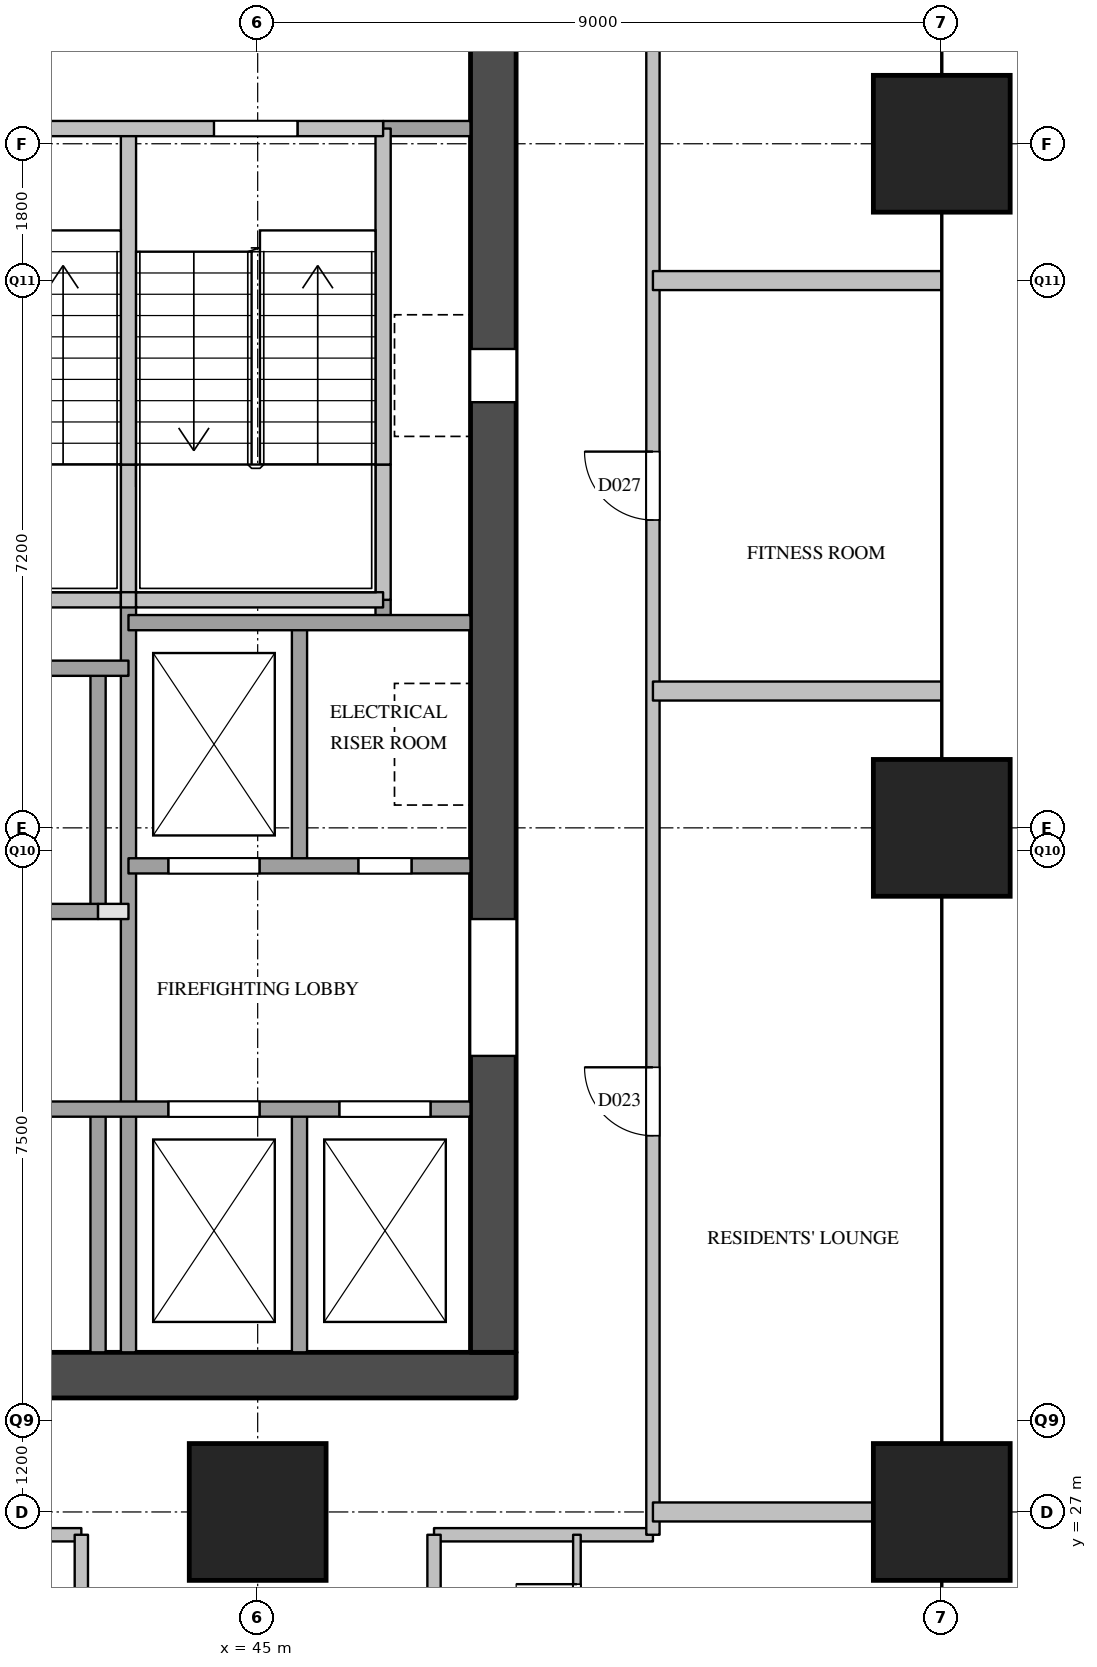
"""IFC4 building model, lengths in metres.
Left out: names, types, materials, properties, quantities, classifications, styles, units other than length and angle.
Written with IfcOpenShell. Run it as: python <this file> out.ifc"""

import sys

from ifc_helpers import new_model, si_unit, direction, frame, frame_2d, origin, origin_2d, place, context, subcontext, project, spatial, rectangle, extrude, element, fill, save


model = new_model("IFC4")
c1 = context("Model", 3, precision=1e-05, world=origin(), true_north=direction((0.0, 1.0)))
c2 = subcontext(c1, "Body", "Model", "MODEL_VIEW")
j1 = project(units=[si_unit("LENGTHUNIT", "METRE"), si_unit("PLANEANGLEUNIT", "RADIAN")], contexts=[c1])
p1 = place(None, origin())
s1 = spatial("IfcSite", under=j1, at=p1, CompositionType="ELEMENT")
p2 = place(p1, origin())
s2 = spatial("IfcBuilding", under=s1, at=p2, CompositionType="ELEMENT")
p3 = place(p2, frame((0.0, 0.0, 31.0)))
s3 = spatial("IfcBuildingStorey", under=s2, at=p3, CompositionType="ELEMENT", Elevation=31.0)
for number, where, z_axis, x_axis in (
    (1, (45.0, 27.0, 0.0), (0.0, 0.0, 1.0), (1.0, 0.0, 0.0)),
    (2, (54.0, 27.0, 0.0), (0.0, 0.0, 1.0), (1.0, 0.0, 0.0)),
    (3, (54.0, 36.0, 0.0), (0.0, 0.0, 1.0), (1.0, 0.0, 0.0)),
    (4, (54.0, 45.0, 0.0), (0.0, 0.0, 1.0), (1.0, 0.0, 0.0)),
):
    element("IfcColumn", number, at=place(p3, frame(where, z_axis=z_axis, x_axis=x_axis)), inside=s3, PredefinedType="COLUMN", context=c2, shape_type="SweptSolid", body=[
        extrude(rectangle(XDim=1.8, YDim=1.8, at=origin_2d()), origin(), (0.0, 0.0, 1.0), 3.8),
    ])
p4 = place(p3, frame((36.0, 28.8, 0.0), z_axis=(0.0, 0.0, 1.0), x_axis=(1.0, 0.0, 0.0)))
e5 = element("IfcWall", 5, at=p4, inside=s3, PredefinedType="SHEAR", context=c2, shape_type="SweptSolid", body=[
    extrude(rectangle(XDim=12.4, YDim=0.6, at=frame_2d((6.2, 0.0))), origin(), (0.0, 0.0, 1.0), 3.5),
])
p5 = place(p3, frame((48.1, 29.1, 0.0), z_axis=(0.0, 0.0, 1.0), x_axis=(0.0, 1.0, 0.0)))
e6 = element("IfcWall", 6, at=p5, inside=s3, PredefinedType="SHEAR", context=c2, shape_type="SweptSolid", body=[
    extrude(rectangle(XDim=20.3, YDim=0.6, at=frame_2d((10.15, 0.0))), origin(), (0.0, 0.0, 1.0), 3.5),
])
p6 = place(p5, frame((12.5, 0.0, 0.0)))
e7 = element("IfcOpeningElement", 7, at=p6, cuts=e6, PredefinedType="OPENING", context=c2, shape_type="SweptSolid", body=[
    extrude(rectangle(XDim=0.7, YDim=2.1, at=frame_2d((0.35, 1.05))), frame((0.0, 0.31, 0.0), z_axis=(0.0, -1.0, 0.0), x_axis=(1.0, 0.0, 0.0)), (0.0, 0.0, 1.0), 0.62),
])
p7 = place(p5, frame((3.9, 0.0, 0.0)))
e8 = element("IfcOpeningElement", 8, at=p7, cuts=e6, PredefinedType="OPENING", context=c2, shape_type="SweptSolid", body=[
    extrude(rectangle(XDim=1.8, YDim=2.1, at=frame_2d((0.9, 1.05))), frame((0.0, 0.31, 0.0), z_axis=(0.0, -1.0, 0.0), x_axis=(1.0, 0.0, 0.0)), (0.0, 0.0, 1.0), 0.62),
])
p8 = place(p3, frame((42.9, 29.1, 0.0), z_axis=(0.0, 0.0, 1.0), x_axis=(0.0, 1.0, 0.0)))
e9 = element("IfcWall", 9, at=p8, inside=s3, PredefinedType="SOLIDWALL", context=c2, shape_type="SweptSolid", body=[
    extrude(rectangle(XDim=3.2, YDim=0.2, at=frame_2d((1.6, 0.0))), origin(), (0.0, 0.0, 1.0), 3.5),
])
p9 = place(p3, frame((42.9, 34.9, 0.0), z_axis=(0.0, 0.0, 1.0), x_axis=(0.0, 1.0, 0.0)))
e10 = element("IfcWall", 10, at=p9, inside=s3, PredefinedType="SOLIDWALL", context=c2, shape_type="SweptSolid", body=[
    extrude(rectangle(XDim=3.2, YDim=0.2, at=frame_2d((1.6, 0.0))), origin(), (0.0, 0.0, 1.0), 3.5),
])
p10 = place(p3, frame((43.3, 29.1, 0.0), z_axis=(0.0, 0.0, 1.0), x_axis=(0.0, 1.0, 0.0)))
e11 = element("IfcWall", 11, at=p10, inside=s3, PredefinedType="SOLIDWALL", context=c2, shape_type="SweptSolid", body=[
    extrude(rectangle(XDim=9.9, YDim=0.2, at=frame_2d((4.95, 0.0))), origin(), (0.0, 0.0, 1.0), 3.5),
])
p11 = place(p3, frame((43.3, 39.0, 0.0), z_axis=(0.0, 0.0, 1.0), x_axis=(0.0, 1.0, 0.0)))
e12 = element("IfcWall", 12, at=p11, inside=s3, PredefinedType="SOLIDWALL", context=c2, shape_type="SweptSolid", body=[
    extrude(rectangle(XDim=1.78, YDim=0.2, at=frame_2d((0.89, 0.0))), origin(), (0.0, 0.0, 1.0), 3.5),
])
p12 = place(p3, frame((43.3, 40.78, 0.0), z_axis=(0.0, 0.0, 1.0), x_axis=(0.0, 1.0, 0.0)))
e13 = element("IfcWall", 13, at=p12, inside=s3, PredefinedType="SOLIDWALL", context=c2, shape_type="SweptSolid", body=[
    extrude(rectangle(XDim=4.42, YDim=0.2, at=frame_2d((2.21, 0.0))), origin(), (0.0, 0.0, 1.0), 3.5),
])
for number, where, z_axis, x_axis in (
    (14, (45.55, 29.1, 0.0), (0.0, 0.0, 1.0), (0.0, 1.0, 0.0)),
    (15, (45.55, 35.5, 0.0), (0.0, 0.0, 1.0), (0.0, 1.0, 0.0)),
):
    element("IfcWall", number, at=place(p3, frame(where, z_axis=z_axis, x_axis=x_axis)), inside=s3, PredefinedType="SOLIDWALL", context=c2, shape_type="SweptSolid", body=[
        extrude(rectangle(XDim=3.2, YDim=0.2, at=frame_2d((1.6, 0.0))), origin(), (0.0, 0.0, 1.0), 3.5),
    ])
p13 = place(p3, frame((46.65, 38.7, 0.0), z_axis=(0.0, 0.0, 1.0), x_axis=(0.0, 1.0, 0.0)))
e16 = element("IfcWall", 16, at=p13, inside=s3, PredefinedType="SOLIDWALL", context=c2, shape_type="SweptSolid", body=[
    extrude(rectangle(XDim=0.3, YDim=0.2, at=frame_2d((0.15, 0.0))), origin(), (0.0, 0.0, 1.0), 3.5),
])
p14 = place(p3, frame((46.65, 39.0, 0.0), z_axis=(0.0, 0.0, 1.0), x_axis=(0.0, 1.0, 0.0)))
e17 = element("IfcWall", 17, at=p14, inside=s3, PredefinedType="SOLIDWALL", context=c2, shape_type="SweptSolid", body=[
    extrude(rectangle(XDim=1.78, YDim=0.2, at=frame_2d((0.89, 0.0))), origin(), (0.0, 0.0, 1.0), 3.5),
])
p15 = place(p3, frame((46.65, 40.78, 0.0), z_axis=(0.0, 0.0, 1.0), x_axis=(0.0, 1.0, 0.0)))
e18 = element("IfcWall", 18, at=p15, inside=s3, PredefinedType="SOLIDWALL", context=c2, shape_type="SweptSolid", body=[
    extrude(rectangle(XDim=4.42, YDim=0.2, at=frame_2d((2.21, 0.0))), origin(), (0.0, 0.0, 1.0), 3.5),
])
p16 = place(p3, frame((36.6, 32.3, 0.0), z_axis=(0.0, 0.0, 1.0), x_axis=(1.0, 0.0, 0.0)))
e19 = element("IfcWall", 19, at=p16, inside=s3, PredefinedType="SOLIDWALL", context=c2, shape_type="SweptSolid", body=[
    extrude(rectangle(XDim=11.2, YDim=0.2, at=frame_2d((5.6, 0.0))), origin(), (0.0, 0.0, 1.0), 3.5),
])
p17 = place(p16, frame((7.225, 0.0, 0.0)))
e20 = element("IfcOpeningElement", 20, at=p17, cuts=e19, PredefinedType="OPENING", context=c2, shape_type="SweptSolid", body=[
    extrude(rectangle(XDim=1.2, YDim=2.1, at=frame_2d((0.6, 1.05))), frame((0.0, 0.11, 0.0), z_axis=(0.0, -1.0, 0.0), x_axis=(1.0, 0.0, 0.0)), (0.0, 0.0, 1.0), 0.22),
])
p18 = place(p16, frame((9.475, 0.0, 0.0)))
e21 = element("IfcOpeningElement", 21, at=p18, cuts=e19, PredefinedType="OPENING", context=c2, shape_type="SweptSolid", body=[
    extrude(rectangle(XDim=1.2, YDim=2.1, at=frame_2d((0.6, 1.05))), frame((0.0, 0.11, 0.0), z_axis=(0.0, -1.0, 0.0), x_axis=(1.0, 0.0, 0.0)), (0.0, 0.0, 1.0), 0.22),
])
p19 = place(p3, frame((42.9, 34.9, 0.0), z_axis=(0.0, 0.0, 1.0), x_axis=(1.0, 0.0, 0.0)))
e22 = element("IfcWall", 22, at=p19, inside=s3, PredefinedType="PARTITIONING", context=c2, shape_type="SweptSolid", body=[
    extrude(rectangle(XDim=0.4, YDim=0.2, at=frame_2d((0.2, 0.0))), origin(), (0.0, 0.0, 1.0), 3.5),
])
p20 = place(p3, frame((36.6, 34.9, 0.0), z_axis=(0.0, 0.0, 1.0), x_axis=(1.0, 0.0, 0.0)))
e23 = element("IfcWall", 23, at=p20, inside=s3, PredefinedType="SOLIDWALL", context=c2, shape_type="SweptSolid", body=[
    extrude(rectangle(XDim=6.3, YDim=0.2, at=frame_2d((3.15, 0.0))), origin(), (0.0, 0.0, 1.0), 3.5),
])
p21 = place(p3, frame((43.3, 35.5, 0.0), z_axis=(0.0, 0.0, 1.0), x_axis=(1.0, 0.0, 0.0)))
e24 = element("IfcWall", 24, at=p21, inside=s3, PredefinedType="SOLIDWALL", context=c2, shape_type="SweptSolid", body=[
    extrude(rectangle(XDim=4.5, YDim=0.2, at=frame_2d((2.25, 0.0))), origin(), (0.0, 0.0, 1.0), 3.5),
])
p22 = place(p21, frame((0.525, 0.0, 0.0)))
e25 = element("IfcOpeningElement", 25, at=p22, cuts=e24, PredefinedType="OPENING", context=c2, shape_type="SweptSolid", body=[
    extrude(rectangle(XDim=1.2, YDim=2.1, at=frame_2d((0.6, 1.05))), frame((0.0, 0.11, 0.0), z_axis=(0.0, -1.0, 0.0), x_axis=(1.0, 0.0, 0.0)), (0.0, 0.0, 1.0), 0.22),
])
p23 = place(p21, frame((3.025, 0.0, 0.0)))
e26 = element("IfcOpeningElement", 26, at=p23, cuts=e24, PredefinedType="OPENING", context=c2, shape_type="SweptSolid", body=[
    extrude(rectangle(XDim=0.7, YDim=2.1, at=frame_2d((0.35, 1.05))), frame((0.0, 0.11, 0.0), z_axis=(0.0, -1.0, 0.0), x_axis=(1.0, 0.0, 0.0)), (0.0, 0.0, 1.0), 0.22),
])
p24 = place(p3, frame((36.6, 38.1, 0.0), z_axis=(0.0, 0.0, 1.0), x_axis=(1.0, 0.0, 0.0)))
e27 = element("IfcWall", 27, at=p24, inside=s3, PredefinedType="SOLIDWALL", context=c2, shape_type="SweptSolid", body=[
    extrude(rectangle(XDim=6.7, YDim=0.2, at=frame_2d((3.35, 0.0))), origin(), (0.0, 0.0, 1.0), 3.5),
])
p25 = place(p3, frame((43.3, 38.7, 0.0), z_axis=(0.0, 0.0, 1.0), x_axis=(1.0, 0.0, 0.0)))
e28 = element("IfcWall", 28, at=p25, inside=s3, PredefinedType="SOLIDWALL", context=c2, shape_type="SweptSolid", body=[
    extrude(rectangle(XDim=4.5, YDim=0.2, at=frame_2d((2.25, 0.0))), origin(), (0.0, 0.0, 1.0), 3.5),
])
p26 = place(p3, frame((40.05, 39.0, 0.0), z_axis=(0.0, 0.0, 1.0), x_axis=(1.0, 0.0, 0.0)))
e29 = element("IfcWall", 29, at=p26, inside=s3, PredefinedType="SOLIDWALL", context=c2, shape_type="SweptSolid", body=[
    extrude(rectangle(XDim=3.15, YDim=0.2, at=frame_2d((1.575, 0.0))), origin(), (0.0, 0.0, 1.0), 3.5),
])
p27 = place(p3, frame((43.2, 39.0, 0.0), z_axis=(0.0, 0.0, 1.0), x_axis=(1.0, 0.0, 0.0)))
e30 = element("IfcWall", 30, at=p27, inside=s3, PredefinedType="SOLIDWALL", context=c2, shape_type="SweptSolid", body=[
    extrude(rectangle(XDim=0.2, YDim=0.2, at=frame_2d((0.1, 0.0))), origin(), (0.0, 0.0, 1.0), 3.5),
])
p28 = place(p3, frame((43.4, 39.0, 0.0), z_axis=(0.0, 0.0, 1.0), x_axis=(1.0, 0.0, 0.0)))
e31 = element("IfcWall", 31, at=p28, inside=s3, PredefinedType="SOLIDWALL", context=c2, shape_type="SweptSolid", body=[
    extrude(rectangle(XDim=3.25, YDim=0.2, at=frame_2d((1.625, 0.0))), origin(), (0.0, 0.0, 1.0), 3.5),
])
p29 = place(p3, frame((46.65, 45.2, 0.0), z_axis=(0.0, 0.0, 1.0), x_axis=(1.0, 0.0, 0.0)))
e32 = element("IfcWall", 32, at=p29, inside=s3, PredefinedType="SOLIDWALL", context=c2, shape_type="SweptSolid", body=[
    extrude(rectangle(XDim=1.15, YDim=0.2, at=frame_2d((0.575, 0.0))), origin(), (0.0, 0.0, 1.0), 3.5),
])
p30 = place(p3, frame((36.6, 45.2, 0.0), z_axis=(0.0, 0.0, 1.0), x_axis=(1.0, 0.0, 0.0)))
e33 = element("IfcWall", 33, at=p30, inside=s3, PredefinedType="SOLIDWALL", context=c2, shape_type="SweptSolid", body=[
    extrude(rectangle(XDim=10.05, YDim=0.2, at=frame_2d((5.025, 0.0))), origin(), (0.0, 0.0, 1.0), 3.5),
])
p31 = place(p30, frame((1.125, 0.0, 0.0)))
e34 = element("IfcOpeningElement", 34, at=p31, cuts=e33, PredefinedType="OPENING", context=c2, shape_type="SweptSolid", body=[
    extrude(rectangle(XDim=1.1, YDim=2.1, at=frame_2d((0.55, 1.05))), frame((0.0, 0.11, 0.0), z_axis=(0.0, -1.0, 0.0), x_axis=(1.0, 0.0, 0.0)), (0.0, 0.0, 1.0), 0.22),
])
p32 = place(p30, frame((4.475, 0.0, 0.0)))
e35 = element("IfcOpeningElement", 35, at=p32, cuts=e33, PredefinedType="OPENING", context=c2, shape_type="SweptSolid", body=[
    extrude(rectangle(XDim=1.1, YDim=2.1, at=frame_2d((0.55, 1.05))), frame((0.0, 0.11, 0.0), z_axis=(0.0, -1.0, 0.0), x_axis=(1.0, 0.0, 0.0)), (0.0, 0.0, 1.0), 0.22),
])
p33 = place(p30, frame((7.825, 0.0, 0.0)))
e36 = element("IfcOpeningElement", 36, at=p33, cuts=e33, PredefinedType="OPENING", context=c2, shape_type="SweptSolid", body=[
    extrude(rectangle(XDim=1.1, YDim=2.1, at=frame_2d((0.55, 1.05))), frame((0.0, 0.11, 0.0), z_axis=(0.0, -1.0, 0.0), x_axis=(1.0, 0.0, 0.0)), (0.0, 0.0, 1.0), 0.22),
])
p34 = place(p3, frame((38.32, 26.7, 0.0), z_axis=(0.0, 0.0, 1.0), x_axis=(1.0, 0.0, 0.0)))
e37 = element("IfcWall", 37, at=p34, inside=s3, PredefinedType="PARTITIONING", context=c2, shape_type="SweptSolid", body=[
    extrude(rectangle(XDim=4.36, YDim=0.175, at=frame_2d((2.18, 0.0))), origin(), (0.0, 0.0, 1.0), 2.5),
])
p35 = place(p3, frame((47.32, 26.7, 0.0), z_axis=(0.0, 0.0, 1.0), x_axis=(1.0, 0.0, 0.0)))
e38 = element("IfcWall", 38, at=p35, inside=s3, PredefinedType="PARTITIONING", context=c2, shape_type="SweptSolid", body=[
    extrude(rectangle(XDim=2.88, YDim=0.175, at=frame_2d((1.44, 0.0))), origin(), (0.0, 0.0, 1.0), 2.5),
])
p36 = place(p3, frame((42.68, 24.3, 0.0), z_axis=(0.0, 0.0, 1.0), x_axis=(0.0, 1.0, 0.0)))
e39 = element("IfcWall", 39, at=p36, inside=s3, PredefinedType="PARTITIONING", context=c2, shape_type="SweptSolid", body=[
    extrude(rectangle(XDim=2.4, YDim=0.175, at=frame_2d((1.2, 0.0))), origin(), (0.0, 0.0, 1.0), 2.5),
])
p37 = place(p3, frame((47.32, 24.89, 0.0), z_axis=(0.0, 0.0, 1.0), x_axis=(0.0, 1.0, 0.0)))
e40 = element("IfcWall", 40, at=p37, inside=s3, PredefinedType="PARTITIONING", context=c2, shape_type="SweptSolid", body=[
    extrude(rectangle(XDim=1.81, YDim=0.175, at=frame_2d((0.905, 0.0))), origin(), (0.0, 0.0, 1.0), 2.5),
])
p38 = place(p3, frame((50.2, 26.7, 0.0), z_axis=(0.0, 0.0, 1.0), x_axis=(0.0, 1.0, 0.0)))
e41 = element("IfcWall", 41, at=p38, inside=s3, PredefinedType="PARTITIONING", context=c2, shape_type="SweptSolid", body=[
    extrude(rectangle(XDim=25.1, YDim=0.175, at=frame_2d((12.55, 0.0))), origin(), (0.0, 0.0, 1.0), 2.5),
])
p39 = place(p38, frame((5.25, 0.0, 0.0)))
e42 = element("IfcOpeningElement", 42, at=p39, cuts=e41, PredefinedType="OPENING", context=c2, shape_type="SweptSolid", body=[
    extrude(rectangle(XDim=0.9, YDim=2.1, at=frame_2d((0.45, 1.05))), frame((0.0, 0.097, 0.0), z_axis=(0.0, -1.0, 0.0), x_axis=(1.0, 0.0, 0.0)), (0.0, 0.0, 1.0), 0.195),
])
p40 = place(p38, frame((13.35, 0.0, 0.0)))
e43 = element("IfcOpeningElement", 43, at=p40, cuts=e41, PredefinedType="OPENING", context=c2, shape_type="SweptSolid", body=[
    extrude(rectangle(XDim=0.9, YDim=2.1, at=frame_2d((0.45, 1.05))), frame((0.0, 0.097, 0.0), z_axis=(0.0, -1.0, 0.0), x_axis=(1.0, 0.0, 0.0)), (0.0, 0.0, 1.0), 0.195),
])
p41 = place(p38, frame((20.35, 0.0, 0.0)))
e44 = element("IfcOpeningElement", 44, at=p41, cuts=e41, PredefinedType="OPENING", context=c2, shape_type="SweptSolid", body=[
    extrude(rectangle(XDim=0.9, YDim=2.1, at=frame_2d((0.45, 1.05))), frame((0.0, 0.097, 0.0), z_axis=(0.0, -1.0, 0.0), x_axis=(1.0, 0.0, 0.0)), (0.0, 0.0, 1.0), 0.195),
])
for number, where, z_axis, x_axis in (
    (45, (50.2, 27.0, 0.0), (0.0, 0.0, 1.0), (1.0, 0.0, 0.0)),
    (46, (50.2, 37.8, 0.0), (0.0, 0.0, 1.0), (1.0, 0.0, 0.0)),
    (47, (50.2, 43.2, 0.0), (0.0, 0.0, 1.0), (1.0, 0.0, 0.0)),
):
    element("IfcWall", number, at=place(p3, frame(where, z_axis=z_axis, x_axis=x_axis)), inside=s3, PredefinedType="PARTITIONING", context=c2, shape_type="SweptSolid", body=[
        extrude(rectangle(XDim=3.8, YDim=0.25, at=frame_2d((1.9, 0.0))), origin(), (0.0, 0.0, 1.0), 2.5),
    ])
p42 = place(p3, frame((49.2, 24.6, 0.0), z_axis=(0.0, 0.0, 1.0), x_axis=(0.0, 1.0, 0.0)))
e48 = element("IfcWall", 48, at=p42, inside=s3, PredefinedType="PARTITIONING", context=c2, shape_type="SweptSolid", body=[
    extrude(rectangle(XDim=2.1, YDim=0.1, at=frame_2d((1.05, 0.0))), origin(), (0.0, 0.0, 1.0), 2.5),
])
p43 = place(p42, frame((0.65, 0.0, 0.0)))
e49 = element("IfcOpeningElement", 49, at=p43, cuts=e48, PredefinedType="OPENING", context=c2, shape_type="SweptSolid", body=[
    extrude(rectangle(XDim=0.8, YDim=2.1, at=frame_2d((0.4, 1.05))), frame((0.0, 0.06, 0.0), z_axis=(0.0, -1.0, 0.0), x_axis=(1.0, 0.0, 0.0)), (0.0, 0.0, 1.0), 0.12),
])
p44 = place(p17, origin())
e50 = element("IfcDoor", 50, at=p44, inside=s3, OperationType="SLIDING_TO_LEFT", PredefinedType="DOOR", context=c2, shape_type="SweptSolid", body=[
    extrude(rectangle(XDim=1.2, YDim=2.1, at=frame_2d((0.6, 1.05))), frame((0.0, 0.025, 0.0), z_axis=(0.0, -1.0, 0.0), x_axis=(1.0, 0.0, 0.0)), (0.0, 0.0, 1.0), 0.05),
])
fill(e20, e50)
p45 = place(p18, origin())
e51 = element("IfcDoor", 51, at=p45, inside=s3, OperationType="SLIDING_TO_LEFT", PredefinedType="DOOR", context=c2, shape_type="SweptSolid", body=[
    extrude(rectangle(XDim=1.2, YDim=2.1, at=frame_2d((0.6, 1.05))), frame((0.0, 0.025, 0.0), z_axis=(0.0, -1.0, 0.0), x_axis=(1.0, 0.0, 0.0)), (0.0, 0.0, 1.0), 0.05),
])
fill(e21, e51)
p46 = place(p22, origin())
e52 = element("IfcDoor", 52, at=p46, inside=s3, OperationType="SLIDING_TO_LEFT", PredefinedType="DOOR", context=c2, shape_type="SweptSolid", body=[
    extrude(rectangle(XDim=1.2, YDim=2.1, at=frame_2d((0.6, 1.05))), frame((0.0, 0.025, 0.0), z_axis=(0.0, -1.0, 0.0), x_axis=(1.0, 0.0, 0.0)), (0.0, 0.0, 1.0), 0.05),
])
fill(e25, e52)
p47 = place(p33, origin())
e53 = element("IfcDoor", 53, at=p47, inside=s3, OperationType="SINGLE_SWING_RIGHT", PredefinedType="DOOR", context=c2, shape_type="SweptSolid", body=[
    extrude(rectangle(XDim=1.1, YDim=2.1, at=frame_2d((0.55, 1.05))), frame((0.0, 0.025, 0.0), z_axis=(0.0, -1.0, 0.0), x_axis=(1.0, 0.0, 0.0)), (0.0, 0.0, 1.0), 0.05),
])
fill(e36, e53)
p48 = place(p6, origin())
e54 = element("IfcDoor", 54, at=p48, inside=s3, OperationType="SINGLE_SWING_RIGHT", PredefinedType="DOOR", context=c2, shape_type="SweptSolid", body=[
    extrude(rectangle(XDim=0.7, YDim=2.1, at=frame_2d((0.35, 1.05))), frame((0.0, 0.025, 0.0), z_axis=(0.0, -1.0, 0.0), x_axis=(1.0, 0.0, 0.0)), (0.0, 0.0, 1.0), 0.05),
])
fill(e7, e54)
p49 = place(p7, origin())
e55 = element("IfcDoor", 55, at=p49, inside=s3, OperationType="DOUBLE_DOOR_SINGLE_SWING", PredefinedType="DOOR", context=c2, shape_type="SweptSolid", body=[
    extrude(rectangle(XDim=1.8, YDim=2.1, at=frame_2d((0.9, 1.05))), frame((0.0, 0.025, 0.0), z_axis=(0.0, -1.0, 0.0), x_axis=(1.0, 0.0, 0.0)), (0.0, 0.0, 1.0), 0.05),
])
fill(e8, e55)
p50 = place(p23, origin())
e56 = element("IfcDoor", 56, at=p50, inside=s3, OperationType="SINGLE_SWING_RIGHT", PredefinedType="DOOR", context=c2, shape_type="SweptSolid", body=[
    extrude(rectangle(XDim=0.7, YDim=2.1, at=frame_2d((0.35, 1.05))), frame((0.0, 0.025, 0.0), z_axis=(0.0, -1.0, 0.0), x_axis=(1.0, 0.0, 0.0)), (0.0, 0.0, 1.0), 0.05),
])
fill(e26, e56)
p51 = place(p43, origin())
e57 = element("IfcDoor", 57, at=p51, inside=s3, OperationType="SINGLE_SWING_RIGHT", PredefinedType="DOOR", context=c2, shape_type="SweptSolid", body=[
    extrude(rectangle(XDim=0.8, YDim=2.1, at=frame_2d((0.4, 1.05))), frame((0.0, 0.025, 0.0), z_axis=(0.0, -1.0, 0.0), x_axis=(1.0, 0.0, 0.0)), (0.0, 0.0, 1.0), 0.05),
])
fill(e49, e57)
p52 = place(p39, origin())
e58 = element("IfcDoor", 58, at=p52, inside=s3, OperationType="SINGLE_SWING_RIGHT", PredefinedType="DOOR", context=c2, shape_type="SweptSolid", body=[
    extrude(rectangle(XDim=0.9, YDim=2.1, at=frame_2d((0.45, 1.05))), frame((0.0, 0.025, 0.0), z_axis=(0.0, -1.0, 0.0), x_axis=(1.0, 0.0, 0.0)), (0.0, 0.0, 1.0), 0.05),
])
fill(e42, e58)
p53 = place(p40, origin())
e59 = element("IfcDoor", 59, at=p53, inside=s3, OperationType="SINGLE_SWING_RIGHT", PredefinedType="DOOR", context=c2, shape_type="SweptSolid", body=[
    extrude(rectangle(XDim=0.9, YDim=2.1, at=frame_2d((0.45, 1.05))), frame((0.0, 0.025, 0.0), z_axis=(0.0, -1.0, 0.0), x_axis=(1.0, 0.0, 0.0)), (0.0, 0.0, 1.0), 0.05),
])
fill(e43, e59)
save(model, sys.argv[1])
